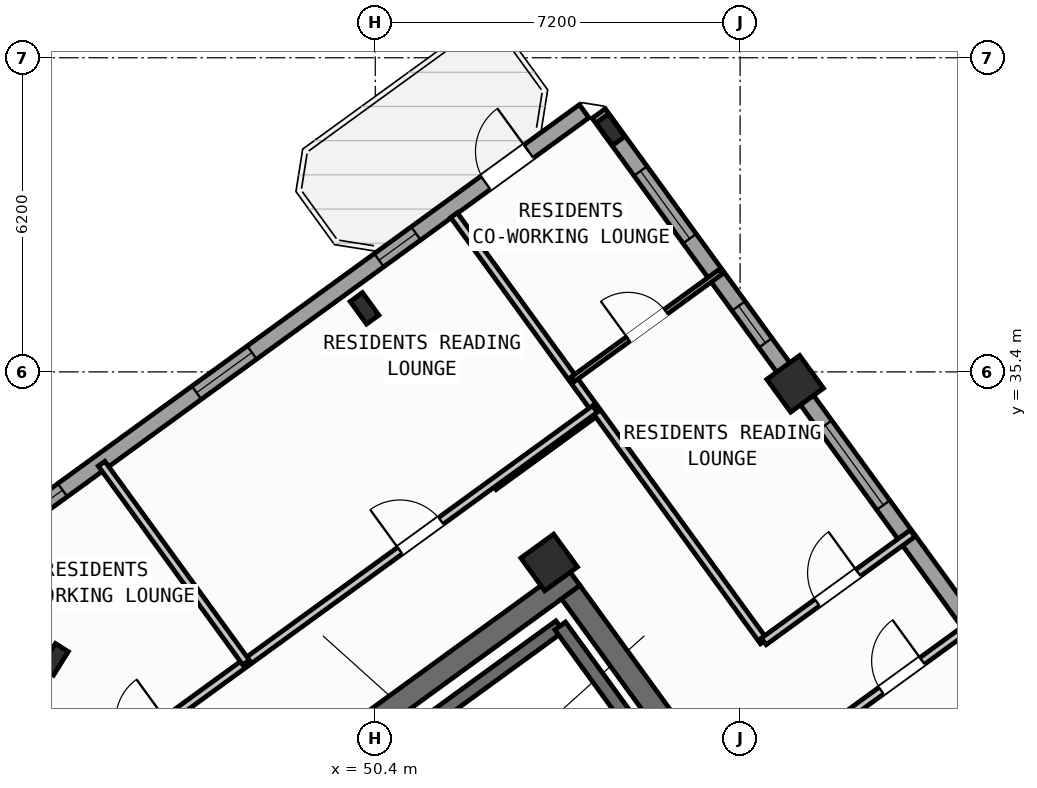
"""IFC4 building model, lengths in metres.
Left out: names, types, materials, properties, quantities, classifications, styles, units other than length and angle.
Written with IfcOpenShell. Run it as: python <this file> out.ifc"""

import sys

from ifc_helpers import new_model, si_unit, direction, frame, frame_2d, origin, origin_2d, place, context, subcontext, project, spatial, rectangle, hollow_rectangle, i_section, extrude, source, transform, mapped, element, fill, save


model = new_model("IFC4")
c1 = context("Model", 3, precision=1e-05, world=origin(), true_north=direction((0.0, 1.0)))
c2 = subcontext(c1, "Body", "Model", "MODEL_VIEW")
j1 = project(units=[si_unit("LENGTHUNIT", "METRE"), si_unit("PLANEANGLEUNIT", "RADIAN")], contexts=[c1])
p1 = place(None, origin())
s1 = spatial("IfcSite", under=j1, at=p1, CompositionType="ELEMENT")
p2 = place(p1, origin())
s2 = spatial("IfcBuilding", under=s1, at=p2, CompositionType="ELEMENT")
p3 = place(p2, frame((0.0, 0.0, 211.2)))
s3 = spatial("IfcBuildingStorey", under=s2, at=p3, CompositionType="ELEMENT", Elevation=211.2)
p4 = place(p3, frame((44.406, 24.172, 0.0), z_axis=(0.0, 0.0, 1.0), x_axis=(0.809012867805, 0.587790931986, 0.0)))
e1 = element("IfcWall", 1, at=p4, inside=s3, PredefinedType="SHEAR", context=c2, shape_type="SweptSolid", body=[
    extrude(rectangle(XDim=12.24, YDim=0.45, at=frame_2d((6.12, 0.0))), origin(), (0.0, 0.0, 1.0), 3.35),
])
p5 = place(p3, frame((58.064, 25.813, 0.0), z_axis=(0.0, 0.0, 1.0), x_axis=(-0.587774812919, 0.809024578921, 0.0)))
e2 = element("IfcWall", 2, at=p5, inside=s3, PredefinedType="SHEAR", context=c2, shape_type="SweptSolid", body=[
    extrude(rectangle(XDim=6.475, YDim=0.45, at=frame_2d((3.238, 0.0))), origin(), (0.0, 0.0, 1.0), 3.35),
])
m1 = source(origin(), c2, "Body", "SweptSolid", [
    extrude(i_section(OverallWidth=0.3, OverallDepth=0.55, WebThickness=0.015, FlangeThickness=0.029, at=origin_2d()), origin(), (0.0, 0.0, 1.0), 3.6),
])
p6 = place(p3, frame((44.068, 29.726, 0.0), z_axis=(0.0, 0.0, 1.0), x_axis=(-0.848048096156, 0.529919264233, 0.0)))
e3 = element("IfcColumn", 3, at=p6, inside=s3, PredefinedType="COLUMN", context=c2, shape_type="MappedRepresentation", body=[
    mapped(m1, transform((0.0, 0.0, 0.0), scale=1.0)),
])
m2 = source(origin(), c2, "Body", "SweptSolid", [
    extrude(hollow_rectangle(XDim=0.8, YDim=0.8, WallThickness=0.032, at=origin_2d()), origin(), (0.0, 0.0, 1.0), 3.6),
])
p7 = place(p3, frame((53.832, 31.638, 0.0), z_axis=(0.0, 0.0, 1.0), x_axis=(0.809016994375, 0.587785252292, 0.0)))
e4 = element("IfcColumn", 4, at=p7, inside=s3, PredefinedType="COLUMN", context=c2, shape_type="MappedRepresentation", body=[
    mapped(m2, transform((0.0, 0.0, 0.0), scale=1.0)),
])
p8 = place(p3, frame((50.188, 36.654, 0.0), z_axis=(0.0, 0.0, 1.0), x_axis=(0.809016994375, 0.587785252292, 0.0)))
e5 = element("IfcColumn", 5, at=p8, inside=s3, PredefinedType="COLUMN", context=c2, shape_type="MappedRepresentation", body=[
    mapped(m1, transform((0.0, 0.0, 0.0), scale=1.0)),
])
p9 = place(p3, frame((58.686, 35.165, 0.0), z_axis=(0.0, 0.0, 1.0), x_axis=(0.809016994375, 0.587785252292, 0.0)))
e6 = element("IfcColumn", 6, at=p9, inside=s3, PredefinedType="COLUMN", context=c2, shape_type="MappedRepresentation", body=[
    mapped(m2, transform((0.0, 0.0, 0.0), scale=1.0)),
])
p10 = place(p3, frame((55.042, 40.181, 0.0), z_axis=(0.0, 0.0, 1.0), x_axis=(0.809016994375, 0.587785252292, 0.0)))
e7 = element("IfcColumn", 7, at=p10, inside=s3, PredefinedType="COLUMN", context=c2, shape_type="MappedRepresentation", body=[
    mapped(m1, transform((0.0, 0.0, 0.0), scale=1.0)),
])
p11 = place(p3, frame((42.207, 31.597, 0.0), z_axis=(0.0, 0.0, 1.0), x_axis=(0.809020333377, 0.587780656523, 0.0)))
e8 = element("IfcWall", 8, at=p11, inside=s3, PredefinedType="STANDARD", context=c2, shape_type="SweptSolid", body=[
    extrude(rectangle(XDim=15.223, YDim=0.32, at=frame_2d((7.611, 0.0))), origin(), (0.0, 0.0, 1.0), 3.35),
])
p12 = place(p11, frame((12.82, 0.0, 0.0)))
e9 = element("IfcOpeningElement", 9, at=p12, cuts=e8, PredefinedType="OPENING", context=c2, shape_type="SweptSolid", body=[
    extrude(rectangle(XDim=1.05, YDim=2.15, at=frame_2d((0.525, 1.075))), frame((0.0, 0.17, 0.0), z_axis=(0.0, -1.0, 0.0), x_axis=(1.0, 0.0, 0.0)), (0.0, 0.0, 1.0), 0.34),
])
p13 = place(p11, frame((0.85, 0.0, 0.9)))
e10 = element("IfcOpeningElement", 10, at=p13, cuts=e8, PredefinedType="OPENING", context=c2, shape_type="SweptSolid", body=[
    extrude(rectangle(XDim=1.65, YDim=1.45, at=frame_2d((0.825, 0.725))), frame((0.0, 0.17, 0.0), z_axis=(0.0, -1.0, 0.0), x_axis=(1.0, 0.0, 0.0)), (0.0, 0.0, 1.0), 0.34),
])
p14 = place(p11, frame((5.769, 0.0, 0.9)))
e11 = element("IfcOpeningElement", 11, at=p14, cuts=e8, PredefinedType="OPENING", context=c2, shape_type="SweptSolid", body=[
    extrude(rectangle(XDim=1.35, YDim=1.45, at=frame_2d((0.675, 0.725))), frame((0.0, 0.17, 0.0), z_axis=(0.0, -1.0, 0.0), x_axis=(1.0, 0.0, 0.0)), (0.0, 0.0, 1.0), 0.34),
])
p15 = place(p11, frame((10.219, 0.0, 1.0)))
e12 = element("IfcOpeningElement", 12, at=p15, cuts=e8, PredefinedType="OPENING", context=c2, shape_type="SweptSolid", body=[
    extrude(rectangle(XDim=0.9, YDim=1.25, at=frame_2d((0.45, 0.625))), frame((0.0, 0.17, 0.0), z_axis=(0.0, -1.0, 0.0), x_axis=(1.0, 0.0, 0.0)), (0.0, 0.0, 1.0), 0.34),
])
p16 = place(p3, frame((54.81, 40.5, 0.0), z_axis=(0.0, 0.0, 1.0), x_axis=(0.587783625747, -0.809018176127, 0.0)))
e13 = element("IfcWall", 13, at=p16, inside=s3, PredefinedType="STANDARD", context=c2, shape_type="SweptSolid", body=[
    extrude(rectangle(XDim=21.587, YDim=0.32, at=frame_2d((10.794, 0.0))), origin(), (0.0, 0.0, 1.0), 2.825),
])
p17 = place(p16, frame((1.403, 0.0, 0.9)))
e14 = element("IfcOpeningElement", 14, at=p17, cuts=e13, PredefinedType="OPENING", context=c2, shape_type="SweptSolid", body=[
    extrude(rectangle(XDim=1.65, YDim=1.45, at=frame_2d((0.825, 0.725))), frame((0.0, 0.17, 0.0), z_axis=(0.0, -1.0, 0.0), x_axis=(1.0, 0.0, 0.0)), (0.0, 0.0, 1.0), 0.34),
])
p18 = place(p16, frame((4.695, 0.0, 1.0)))
e15 = element("IfcOpeningElement", 15, at=p18, cuts=e13, PredefinedType="OPENING", context=c2, shape_type="SweptSolid", body=[
    extrude(rectangle(XDim=0.9, YDim=1.25, at=frame_2d((0.45, 0.625))), frame((0.0, 0.17, 0.0), z_axis=(0.0, -1.0, 0.0), x_axis=(1.0, 0.0, 0.0)), (0.0, 0.0, 1.0), 0.34),
])
p19 = place(p16, frame((7.604, 0.0, 0.95)))
e16 = element("IfcOpeningElement", 16, at=p19, cuts=e13, PredefinedType="OPENING", context=c2, shape_type="SweptSolid", body=[
    extrude(rectangle(XDim=1.95, YDim=1.35, at=frame_2d((0.975, 0.675))), frame((0.0, 0.17, 0.0), z_axis=(0.0, -1.0, 0.0), x_axis=(1.0, 0.0, 0.0)), (0.0, 0.0, 1.0), 0.34),
])
p20 = place(p16, frame((15.692, 0.0, 1.0)))
e17 = element("IfcOpeningElement", 17, at=p20, cuts=e13, PredefinedType="OPENING", context=c2, shape_type="SweptSolid", body=[
    extrude(rectangle(XDim=0.9, YDim=1.25, at=frame_2d((0.45, 0.625))), frame((0.0, 0.17, 0.0), z_axis=(0.0, -1.0, 0.0), x_axis=(1.0, 0.0, 0.0)), (0.0, 0.0, 1.0), 0.34),
])
p21 = place(p16, frame((18.872, 0.0, 0.9)))
e18 = element("IfcOpeningElement", 18, at=p21, cuts=e13, PredefinedType="OPENING", context=c2, shape_type="SweptSolid", body=[
    extrude(rectangle(XDim=1.35, YDim=1.45, at=frame_2d((0.675, 0.725))), frame((0.0, 0.17, 0.0), z_axis=(0.0, -1.0, 0.0), x_axis=(1.0, 0.0, 0.0)), (0.0, 0.0, 1.0), 0.34),
])
p22 = place(p3, frame((48.006, 25.996, 0.0), z_axis=(0.0, 0.0, 1.0), x_axis=(0.80901903764, 0.587782439969, 0.0)))
e19 = element("IfcWall", 19, at=p22, inside=s3, PredefinedType="SHEAR", context=c2, shape_type="SweptSolid", body=[
    extrude(rectangle(XDim=7.46, YDim=0.26, at=frame_2d((3.73, 0.0))), origin(), (0.0, 0.0, 1.0), 3.35),
])
p23 = place(p3, frame((55.906, 27.831, 0.0), z_axis=(0.0, 0.0, 1.0), x_axis=(-0.587804123638, 0.809003283204, 0.0)))
e20 = element("IfcWall", 20, at=p23, inside=s3, PredefinedType="SHEAR", context=c2, shape_type="SweptSolid", body=[
    extrude(rectangle(XDim=3.16, YDim=0.26, at=frame_2d((1.58, 0.0))), origin(), (0.0, 0.0, 1.0), 3.35),
])
p24 = place(p3, frame((52.739, 33.143, 0.0), z_axis=(0.0, 0.0, 1.0), x_axis=(0.809000999347, 0.58780726693, 0.0)))
e21 = element("IfcWall", 21, at=p24, inside=s3, PredefinedType="PARTITIONING", context=c2, shape_type="SweptSolid", body=[
    extrude(rectangle(XDim=2.51, YDim=0.16, at=frame_2d((1.255, 0.0))), origin(), (0.0, 0.0, 1.0), 3.34),
])
p25 = place(p3, frame((58.067, 30.08, 0.0), z_axis=(0.0, 0.0, 1.0), x_axis=(-0.587787785243, 0.809015154073, 0.0)))
e22 = element("IfcWall", 22, at=p25, inside=s3, PredefinedType="PARTITIONING", context=c2, shape_type="SweptSolid", body=[
    extrude(rectangle(XDim=10.4, YDim=0.16, at=frame_2d((5.2, 0.0))), origin(), (0.0, 0.0, 1.0), 3.34),
])
p26 = place(p3, frame((59.331, 28.341, 0.0), z_axis=(0.0, 0.0, 1.0), x_axis=(0.809003564202, 0.587803736896, 0.0)))
e23 = element("IfcWall", 23, at=p26, inside=s3, PredefinedType="PARTITIONING", context=c2, shape_type="SweptSolid", body=[
    extrude(rectangle(XDim=3.63, YDim=0.16, at=frame_2d((1.815, 0.0))), origin(), (0.0, 0.0, 1.0), 3.34),
])
p27 = place(p26, frame((1.305, 0.0, 0.0)))
e24 = element("IfcOpeningElement", 24, at=p27, cuts=e23, PredefinedType="OPENING", context=c2, shape_type="SweptSolid", body=[
    extrude(rectangle(XDim=1.0, YDim=2.1, at=frame_2d((0.5, 1.05))), frame((0.0, 0.09, 0.0), z_axis=(0.0, -1.0, 0.0), x_axis=(1.0, 0.0, 0.0)), (0.0, 0.0, 1.0), 0.18),
])
p28 = place(p3, frame((58.067, 30.08, 0.0), z_axis=(0.0, 0.0, 1.0), x_axis=(0.809012309495, 0.587791700422, 0.0)))
e25 = element("IfcWall", 25, at=p28, inside=s3, PredefinedType="PARTITIONING", context=c2, shape_type="SweptSolid", body=[
    extrude(rectangle(XDim=3.63, YDim=0.16, at=frame_2d((1.815, 0.0))), origin(), (0.0, 0.0, 1.0), 3.34),
])
p29 = place(p28, frame((1.305, 0.0, 0.0)))
e26 = element("IfcOpeningElement", 26, at=p29, cuts=e25, PredefinedType="OPENING", context=c2, shape_type="SweptSolid", body=[
    extrude(rectangle(XDim=1.0, YDim=2.1, at=frame_2d((0.5, 1.05))), frame((0.0, 0.09, 0.0), z_axis=(0.0, -1.0, 0.0), x_axis=(1.0, 0.0, 0.0)), (0.0, 0.0, 1.0), 0.18),
])
p30 = place(p3, frame((54.304, 35.259, 0.0), z_axis=(0.0, 0.0, 1.0), x_axis=(0.809005039917, 0.58780170584, 0.0)))
e27 = element("IfcWall", 27, at=p30, inside=s3, PredefinedType="PARTITIONING", context=c2, shape_type="SweptSolid", body=[
    extrude(rectangle(XDim=3.61, YDim=0.11, at=frame_2d((1.805, 0.0))), origin(), (0.0, 0.0, 1.0), 3.34),
])
p31 = place(p30, frame((1.345, 0.0, 0.0)))
e28 = element("IfcOpeningElement", 28, at=p31, cuts=e27, PredefinedType="OPENING", context=c2, shape_type="SweptSolid", body=[
    extrude(rectangle(XDim=0.92, YDim=2.08, at=frame_2d((0.46, 1.04))), frame((0.0, 0.065, 0.0), z_axis=(0.0, -1.0, 0.0), x_axis=(1.0, 0.0, 0.0)), (0.0, 0.0, 1.0), 0.13),
])
p32 = place(p3, frame((42.866, 26.044, 0.0), z_axis=(0.0, 0.0, 1.0), x_axis=(0.809020254154, 0.587780765566, 0.0)))
e29 = element("IfcWall", 29, at=p32, inside=s3, PredefinedType="PARTITIONING", context=c2, shape_type="SweptSolid", body=[
    extrude(rectangle(XDim=14.67, YDim=0.16, at=frame_2d((7.335, 0.0))), origin(), (0.0, 0.0, 1.0), 3.34),
])
p33 = place(p32, frame((3.215, 0.0, 0.0)))
e30 = element("IfcOpeningElement", 30, at=p33, cuts=e29, PredefinedType="OPENING", context=c2, shape_type="SweptSolid", body=[
    extrude(rectangle(XDim=1.0, YDim=2.1, at=frame_2d((0.5, 1.05))), frame((0.0, 0.09, 0.0), z_axis=(0.0, -1.0, 0.0), x_axis=(1.0, 0.0, 0.0)), (0.0, 0.0, 1.0), 0.18),
])
p34 = place(p32, frame((9.915, 0.0, 0.0)))
e31 = element("IfcOpeningElement", 31, at=p34, cuts=e29, PredefinedType="OPENING", context=c2, shape_type="SweptSolid", body=[
    extrude(rectangle(XDim=1.0, YDim=2.1, at=frame_2d((0.5, 1.05))), frame((0.0, 0.09, 0.0), z_axis=(0.0, -1.0, 0.0), x_axis=(1.0, 0.0, 0.0)), (0.0, 0.0, 1.0), 0.18),
])
p35 = place(p3, frame((43.969, 26.55, 0.0), z_axis=(0.0, 0.0, 1.0), x_axis=(-0.587776919386, 0.80902304852, 0.0)))
e32 = element("IfcWall", 32, at=p35, inside=s3, PredefinedType="PARTITIONING", context=c2, shape_type="SweptSolid", body=[
    extrude(rectangle(XDim=5.48, YDim=0.16, at=frame_2d((2.74, 0.0))), origin(), (0.0, 0.0, 1.0), 3.34),
])
p36 = place(p3, frame((47.849, 29.665, 0.0), z_axis=(0.0, 0.0, 1.0), x_axis=(-0.587785532001, 0.809016791155, 0.0)))
e33 = element("IfcWall", 33, at=p36, inside=s3, PredefinedType="PARTITIONING", context=c2, shape_type="SweptSolid", body=[
    extrude(rectangle(XDim=4.85, YDim=0.16, at=frame_2d((2.425, 0.0))), origin(), (0.0, 0.0, 1.0), 3.34),
])
m3 = source(origin(), c2, "Body", "SweptSolid", [
    extrude(rectangle(XDim=1.05, YDim=2.15, at=frame_2d((0.525, 1.075))), frame((0.0, 0.025, 0.0), z_axis=(0.0, -1.0, 0.0), x_axis=(1.0, 0.0, 0.0)), (0.0, 0.0, 1.0), 0.05),
])
p37 = place(p12, origin())
e34 = element("IfcDoor", 34, at=p37, inside=s3, OperationType="SINGLE_SWING_RIGHT", PredefinedType="DOOR", context=c2, shape_type="MappedRepresentation", body=[
    mapped(m3, transform((0.0, 0.0, 0.0), scale=1.0)),
])
fill(e9, e34)
m4 = source(origin(), c2, "Body", "SweptSolid", [
    extrude(rectangle(XDim=1.65, YDim=1.45, at=frame_2d((0.825, 0.725))), frame((0.0, 0.03, 0.0), z_axis=(0.0, -1.0, 0.0), x_axis=(1.0, 0.0, 0.0)), (0.0, 0.0, 1.0), 0.06),
])
p38 = place(p13, origin())
e35 = element("IfcWindow", 35, at=p38, inside=s3, PartitioningType="SINGLE_PANEL", PredefinedType="WINDOW", context=c2, shape_type="MappedRepresentation", body=[
    mapped(m4, transform((0.0, 0.0, 0.0), scale=1.0)),
])
fill(e10, e35)
m5 = source(origin(), c2, "Body", "SweptSolid", [
    extrude(rectangle(XDim=1.35, YDim=1.45, at=frame_2d((0.675, 0.725))), frame((0.0, 0.03, 0.0), z_axis=(0.0, -1.0, 0.0), x_axis=(1.0, 0.0, 0.0)), (0.0, 0.0, 1.0), 0.06),
])
p39 = place(p14, origin())
e36 = element("IfcWindow", 36, at=p39, inside=s3, PartitioningType="SINGLE_PANEL", PredefinedType="WINDOW", context=c2, shape_type="MappedRepresentation", body=[
    mapped(m5, transform((0.0, 0.0, 0.0), scale=1.0)),
])
fill(e11, e36)
m6 = source(origin(), c2, "Body", "SweptSolid", [
    extrude(rectangle(XDim=0.9, YDim=1.25, at=frame_2d((0.45, 0.625))), frame((0.0, 0.03, 0.0), z_axis=(0.0, -1.0, 0.0), x_axis=(1.0, 0.0, 0.0)), (0.0, 0.0, 1.0), 0.06),
])
p40 = place(p15, origin())
e37 = element("IfcWindow", 37, at=p40, inside=s3, PartitioningType="SINGLE_PANEL", PredefinedType="WINDOW", context=c2, shape_type="MappedRepresentation", body=[
    mapped(m6, transform((0.0, 0.0, 0.0), scale=1.0)),
])
fill(e12, e37)
p41 = place(p17, origin())
e38 = element("IfcWindow", 38, at=p41, inside=s3, PartitioningType="SINGLE_PANEL", PredefinedType="WINDOW", context=c2, shape_type="MappedRepresentation", body=[
    mapped(m4, transform((0.0, 0.0, 0.0), scale=1.0)),
])
fill(e14, e38)
p42 = place(p18, origin())
e39 = element("IfcWindow", 39, at=p42, inside=s3, PartitioningType="SINGLE_PANEL", PredefinedType="WINDOW", context=c2, shape_type="MappedRepresentation", body=[
    mapped(m6, transform((0.0, 0.0, 0.0), scale=1.0)),
])
fill(e15, e39)
m7 = source(origin(), c2, "Body", "SweptSolid", [
    extrude(rectangle(XDim=1.95, YDim=1.35, at=frame_2d((0.975, 0.675))), frame((0.0, 0.03, 0.0), z_axis=(0.0, -1.0, 0.0), x_axis=(1.0, 0.0, 0.0)), (0.0, 0.0, 1.0), 0.06),
])
p43 = place(p19, origin())
e40 = element("IfcWindow", 40, at=p43, inside=s3, PartitioningType="SINGLE_PANEL", PredefinedType="WINDOW", context=c2, shape_type="MappedRepresentation", body=[
    mapped(m7, transform((0.0, 0.0, 0.0), scale=1.0)),
])
fill(e16, e40)
m8 = source(origin(), c2, "Body", "SweptSolid", [
    extrude(rectangle(XDim=1.0, YDim=2.1, at=frame_2d((0.5, 1.05))), frame((0.0, 0.025, 0.0), z_axis=(0.0, -1.0, 0.0), x_axis=(1.0, 0.0, 0.0)), (0.0, 0.0, 1.0), 0.05),
])
p44 = place(p29, origin())
e41 = element("IfcDoor", 41, at=p44, inside=s3, OperationType="SINGLE_SWING_RIGHT", PredefinedType="DOOR", context=c2, shape_type="MappedRepresentation", body=[
    mapped(m8, transform((0.0, 0.0, 0.0), scale=1.0)),
])
fill(e26, e41)
m9 = source(origin(), c2, "Body", "SweptSolid", [
    extrude(rectangle(XDim=0.92, YDim=2.08, at=frame_2d((0.46, 1.04))), frame((0.0, 0.025, 0.0), z_axis=(0.0, -1.0, 0.0), x_axis=(1.0, 0.0, 0.0)), (0.0, 0.0, 1.0), 0.05),
])
p45 = place(p31, origin())
e42 = element("IfcDoor", 42, at=p45, inside=s3, OperationType="SINGLE_SWING_LEFT", PredefinedType="DOOR", context=c2, shape_type="MappedRepresentation", body=[
    mapped(m9, transform((0.0, 0.0, 0.0), scale=1.0)),
])
fill(e28, e42)
p46 = place(p27, origin())
e43 = element("IfcDoor", 43, at=p46, inside=s3, OperationType="SINGLE_SWING_RIGHT", PredefinedType="DOOR", context=c2, shape_type="MappedRepresentation", body=[
    mapped(m8, transform((0.0, 0.0, 0.0), scale=1.0)),
])
fill(e24, e43)
p47 = place(p34, origin())
e44 = element("IfcDoor", 44, at=p47, inside=s3, OperationType="SINGLE_SWING_LEFT", PredefinedType="DOOR", context=c2, shape_type="MappedRepresentation", body=[
    mapped(m8, transform((0.0, 0.0, 0.0), scale=1.0)),
])
fill(e31, e44)
save(model, sys.argv[1])
